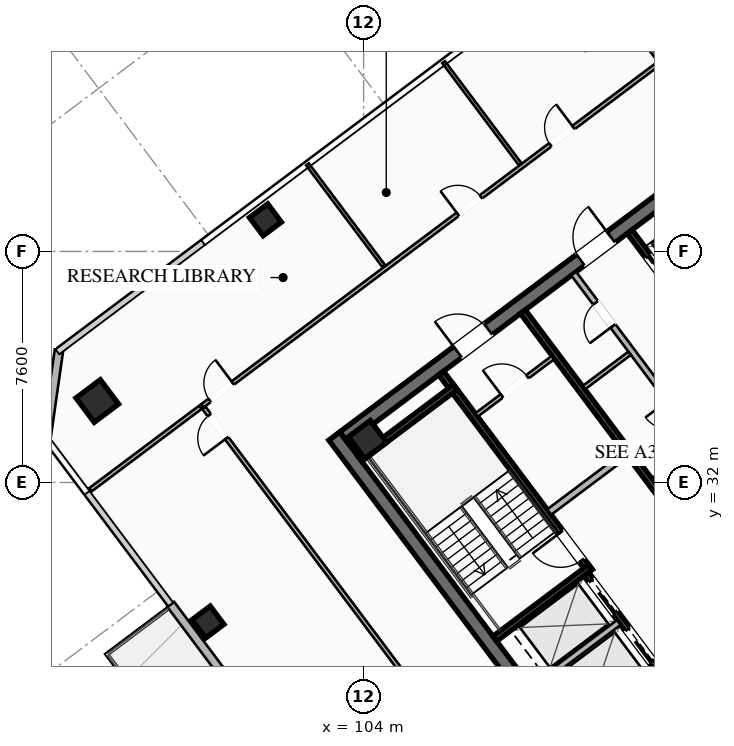
"""IFC4 building model, lengths in metres.
Left out: names, types, materials, properties, quantities, classifications, styles, units other than length and angle.
Written with IfcOpenShell. Run it as: python <this file> out.ifc"""

import sys

from ifc_helpers import new_model, si_unit, direction, frame, frame_2d, origin, origin_2d, place, context, subcontext, project, spatial, rectangle, hollow_rectangle, extrude, element, fill, save


model = new_model("IFC4")
c1 = context("Model", 3, precision=1e-05, world=origin(), true_north=direction((0.0, 1.0)))
c2 = subcontext(c1, "Body", "Model", "MODEL_VIEW")
j1 = project(units=[si_unit("LENGTHUNIT", "METRE"), si_unit("PLANEANGLEUNIT", "RADIAN")], contexts=[c1])
p1 = place(None, origin())
s1 = spatial("IfcSite", under=j1, at=p1, CompositionType="ELEMENT")
p2 = place(p1, origin())
s2 = spatial("IfcBuilding", under=s1, at=p2, CompositionType="ELEMENT")
p3 = place(p2, frame((0.0, 0.0, 221.95)))
s3 = spatial("IfcBuildingStorey", under=s2, at=p3, CompositionType="ELEMENT", Elevation=221.95)
p4 = place(p3, frame((112.396, 21.047, 0.0), z_axis=(0.0, 0.0, 1.0), x_axis=(-0.600005007985, 0.799996243986, 0.0)))
e1 = element("IfcWall", 1, at=p4, inside=s3, PredefinedType="SHEAR", context=c2, shape_type="SweptSolid", body=[
    extrude(rectangle(XDim=15.6, YDim=0.45, at=frame_2d((7.8, 0.0))), origin(), (0.0, 0.0, 1.0), 3.55),
])
p5 = place(p3, frame((124.649, 30.518, 0.0), z_axis=(0.0, 0.0, 1.0), x_axis=(-0.8, -0.6, 0.0)))
e2 = element("IfcWall", 2, at=p5, inside=s3, PredefinedType="SHEAR", context=c2, shape_type="SweptSolid", body=[
    extrude(rectangle(XDim=15.26, YDim=0.45, at=frame_2d((7.63, 0.0))), origin(), (0.0, 0.0, 1.0), 3.55),
])
p6 = place(p5, frame((9.33, 0.0, 0.0)))
e3 = element("IfcOpeningElement", 3, at=p6, cuts=e2, PredefinedType="OPENING", context=c2, shape_type="SweptSolid", body=[
    extrude(rectangle(XDim=1.25, YDim=2.25, at=frame_2d((0.625, 1.125))), frame((0.0, 0.235, 0.0), z_axis=(0.0, -1.0, 0.0), x_axis=(1.0, 0.0, 0.0)), (0.0, 0.0, 1.0), 0.47),
])
p7 = place(p5, frame((4.28, 0.0, 0.0)))
e4 = element("IfcOpeningElement", 4, at=p7, cuts=e2, PredefinedType="OPENING", context=c2, shape_type="SweptSolid", body=[
    extrude(rectangle(XDim=1.25, YDim=2.25, at=frame_2d((0.625, 1.125))), frame((0.0, 0.235, 0.0), z_axis=(0.0, -1.0, 0.0), x_axis=(1.0, 0.0, 0.0)), (0.0, 0.0, 1.0), 0.47),
])
p8 = place(p3, frame((103.351, 33.482, 0.0), z_axis=(0.0, 0.0, 1.0), x_axis=(0.8, 0.6, 0.0)))
e5 = element("IfcWall", 5, at=p8, inside=s3, PredefinedType="SHEAR", context=c2, shape_type="SweptSolid", body=[
    extrude(rectangle(XDim=15.26, YDim=0.45, at=frame_2d((7.63, 0.0))), origin(), (0.0, 0.0, 1.0), 3.55),
])
p9 = place(p8, frame((4.68, 0.0, 0.0)))
e6 = element("IfcOpeningElement", 6, at=p9, cuts=e5, PredefinedType="OPENING", context=c2, shape_type="SweptSolid", body=[
    extrude(rectangle(XDim=1.25, YDim=2.25, at=frame_2d((0.625, 1.125))), frame((0.0, 0.235, 0.0), z_axis=(0.0, -1.0, 0.0), x_axis=(1.0, 0.0, 0.0)), (0.0, 0.0, 1.0), 0.47),
])
p10 = place(p8, frame((9.73, 0.0, 0.0)))
e7 = element("IfcOpeningElement", 7, at=p10, cuts=e5, PredefinedType="OPENING", context=c2, shape_type="SweptSolid", body=[
    extrude(rectangle(XDim=1.25, YDim=2.25, at=frame_2d((0.625, 1.125))), frame((0.0, 0.235, 0.0), z_axis=(0.0, -1.0, 0.0), x_axis=(1.0, 0.0, 0.0)), (0.0, 0.0, 1.0), 0.47),
])
p11 = place(p3, frame((104.13, 33.41, 0.0), z_axis=(0.0, 0.0, 1.0), x_axis=(0.799999996291, 0.600000004945, 0.0)))
e8 = element("IfcColumn", 8, at=p11, inside=s3, PredefinedType="COLUMN", context=c2, shape_type="SweptSolid", body=[
    extrude(hollow_rectangle(XDim=0.9, YDim=0.9, WallThickness=0.04, at=origin_2d()), origin(), (0.0, 0.0, 1.0), 3.37),
])
p12 = place(p3, frame((95.24, 34.68, 0.0), z_axis=(0.0, 0.0, 1.0), x_axis=(0.799999996291, 0.600000004945, 0.0)))
e9 = element("IfcColumn", 9, at=p12, inside=s3, PredefinedType="COLUMN", context=c2, shape_type="SweptSolid", body=[
    extrude(hollow_rectangle(XDim=1.0, YDim=1.0, WallThickness=0.04, at=origin_2d()), origin(), (0.0, 0.0, 1.0), 3.37),
])
for number, where, z_axis, x_axis in (
    (10, (100.77, 40.64, 0.0), (0.0, 0.0, 1.0), (0.8, 0.6, 0.0)),
    (11, (98.88, 27.41, 0.0), (0.0, 0.0, 1.0), (0.8, 0.6, 0.0)),
):
    element("IfcColumn", number, at=place(p3, frame(where, z_axis=z_axis, x_axis=x_axis)), inside=s3, PredefinedType="COLUMN", context=c2, shape_type="SweptSolid", body=[
        extrude(hollow_rectangle(XDim=0.75, YDim=0.75, WallThickness=0.032, at=origin_2d()), origin(), (0.0, 0.0, 1.0), 3.37),
    ])
p13 = place(p3, frame((105.576, 17.432, 0.0), z_axis=(0.0, 0.0, 1.0), x_axis=(-0.599994081423, 0.800004438899, 0.0)))
e12 = element("IfcWall", 12, at=p13, inside=s3, PredefinedType="SOLIDWALL", context=c2, shape_type="SweptSolid", body=[
    extrude(rectangle(XDim=13.2, YDim=0.28, at=frame_2d((6.6, 0.0))), origin(), (0.0, 0.0, 1.0), 3.37),
])
p14 = place(p13, frame((5.95, 0.0, 0.0)))
e13 = element("IfcOpeningElement", 13, at=p14, cuts=e12, PredefinedType="OPENING", context=c2, shape_type="SweptSolid", body=[
    extrude(rectangle(XDim=1.3, YDim=2.15, at=frame_2d((0.65, 1.075))), frame((0.0, 0.15, 0.0), z_axis=(0.0, -1.0, 0.0), x_axis=(1.0, 0.0, 0.0)), (0.0, 0.0, 1.0), 0.3),
])
p15 = place(p13, frame((3.732, 0.0, 0.85)))
e14 = element("IfcOpeningElement", 14, at=p15, cuts=e12, PredefinedType="OPENING", context=c2, shape_type="SweptSolid", body=[
    extrude(rectangle(XDim=1.8, YDim=1.92, at=frame_2d((0.9, 0.96))), frame((0.0, 0.15, 0.0), z_axis=(0.0, -1.0, 0.0), x_axis=(1.0, 0.0, 0.0)), (0.0, 0.0, 1.0), 0.3),
])
p16 = place(p13, frame((7.668, 0.0, 0.85)))
e15 = element("IfcOpeningElement", 15, at=p16, cuts=e12, PredefinedType="OPENING", context=c2, shape_type="SweptSolid", body=[
    extrude(rectangle(XDim=1.8, YDim=1.92, at=frame_2d((0.9, 0.96))), frame((0.0, 0.15, 0.0), z_axis=(0.0, -1.0, 0.0), x_axis=(1.0, 0.0, 0.0)), (0.0, 0.0, 1.0), 0.3),
])
p17 = place(p3, frame((93.56, 33.42, 0.0), z_axis=(0.0, 0.0, 1.0), x_axis=(0.14138683146, 0.989954425158, 0.0)))
e16 = element("IfcWall", 16, at=p17, inside=s3, PredefinedType="SOLIDWALL", context=c2, shape_type="SweptSolid", body=[
    extrude(rectangle(XDim=2.97, YDim=0.28, at=frame_2d((1.485, 0.0))), origin(), (0.0, 0.0, 1.0), 3.37),
])
p18 = place(p3, frame((111.44, 29.08, 0.0), z_axis=(0.0, 0.0, 1.0), x_axis=(-0.59999041401, 0.800007189403, 0.0)))
e17 = element("IfcWall", 17, at=p18, inside=s3, PredefinedType="SHEAR", context=c2, shape_type="SweptSolid", body=[
    extrude(rectangle(XDim=8.15, YDim=0.2, at=frame_2d((4.075, 0.0))), origin(), (0.0, 0.0, 1.0), 3.37),
])
p19 = place(p18, frame((0.45, 0.0, 0.0)))
e18 = element("IfcOpeningElement", 18, at=p19, cuts=e17, PredefinedType="OPENING", context=c2, shape_type="SweptSolid", body=[
    extrude(rectangle(XDim=1.15, YDim=2.2, at=frame_2d((0.575, 1.1))), frame((0.0, 0.11, 0.0), z_axis=(0.0, -1.0, 0.0), x_axis=(1.0, 0.0, 0.0)), (0.0, 0.0, 1.0), 0.22),
])
for number, where, z_axis, x_axis in (
    (19, (108.316, 26.862, 0.0), (0.0, 0.0, 1.0), (0.8, 0.6, 0.0)),
    (20, (103.876, 32.782, 0.0), (0.0, 0.0, 1.0), (0.8, 0.6, 0.0)),
):
    element("IfcWall", number, at=place(p3, frame(where, z_axis=z_axis, x_axis=x_axis)), inside=s3, PredefinedType="SHEAR", context=c2, shape_type="SweptSolid", body=[
        extrude(rectangle(XDim=3.93, YDim=0.2, at=frame_2d((1.965, 0.0))), origin(), (0.0, 0.0, 1.0), 3.37),
    ])
p20 = place(p3, frame((118.058, 25.856, 0.0), z_axis=(0.0, 0.0, 1.0), x_axis=(-0.600002657301, 0.799998007018, 0.0)))
e21 = element("IfcWall", 21, at=p20, inside=s3, PredefinedType="SHEAR", context=c2, shape_type="SweptSolid", body=[
    extrude(rectangle(XDim=14.7, YDim=0.2, at=frame_2d((7.35, 0.0))), origin(), (0.0, 0.0, 1.0), 3.37),
])
p21 = place(p3, frame((110.104, 31.028, 0.0), z_axis=(0.0, 0.0, 1.0), x_axis=(0.800018601094, 0.59997519774, 0.0)))
e22 = element("IfcWall", 22, at=p21, inside=s3, PredefinedType="SOLIDWALL", context=c2, shape_type="SweptSolid", body=[
    extrude(rectangle(XDim=3.15, YDim=0.22, at=frame_2d((1.575, 0.0))), origin(), (0.0, 0.0, 1.0), 2.723),
])
p22 = place(p3, frame((115.25, 23.75, 0.0), z_axis=(0.0, 0.0, 1.0), x_axis=(-0.599994036198, 0.800004472816, 0.0)))
e23 = element("IfcWall", 23, at=p22, inside=s3, PredefinedType="SHEAR", context=c2, shape_type="SweptSolid", body=[
    extrude(rectangle(XDim=6.55, YDim=0.2, at=frame_2d((3.275, 0.0))), origin(), (0.0, 0.0, 1.0), 3.37),
])
p23 = place(p22, frame((4.975, 0.0, 0.0)))
e24 = element("IfcOpeningElement", 24, at=p23, cuts=e23, PredefinedType="OPENING", context=c2, shape_type="SweptSolid", body=[
    extrude(rectangle(XDim=1.3, YDim=2.25, at=frame_2d((0.65, 1.125))), frame((0.0, 0.11, 0.0), z_axis=(0.0, -1.0, 0.0), x_axis=(1.0, 0.0, 0.0)), (0.0, 0.0, 1.0), 0.22),
])
p24 = place(p22, frame((2.975, 0.0, 0.0)))
e25 = element("IfcOpeningElement", 25, at=p24, cuts=e23, PredefinedType="OPENING", context=c2, shape_type="SweptSolid", body=[
    extrude(rectangle(XDim=1.3, YDim=2.25, at=frame_2d((0.65, 1.125))), frame((0.0, 0.11, 0.0), z_axis=(0.0, -1.0, 0.0), x_axis=(1.0, 0.0, 0.0)), (0.0, 0.0, 1.0), 0.22),
])
p25 = place(p22, frame((0.775, 0.0, 0.0)))
e26 = element("IfcOpeningElement", 26, at=p25, cuts=e23, PredefinedType="OPENING", context=c2, shape_type="SweptSolid", body=[
    extrude(rectangle(XDim=1.3, YDim=2.25, at=frame_2d((0.65, 1.125))), frame((0.0, 0.11, 0.0), z_axis=(0.0, -1.0, 0.0), x_axis=(1.0, 0.0, 0.0)), (0.0, 0.0, 1.0), 0.22),
])
p26 = place(p3, frame((109.528, 25.246, 0.0), z_axis=(0.0, 0.0, 1.0), x_axis=(0.800008183455, 0.599989088572, 0.0)))
e27 = element("IfcWall", 27, at=p26, inside=s3, PredefinedType="SOLIDWALL", context=c2, shape_type="SweptSolid", body=[
    extrude(rectangle(XDim=3.58, YDim=0.2, at=frame_2d((1.79, 0.0))), origin(), (0.0, 0.0, 1.0), 3.37),
])
p27 = place(p3, frame((112.75, 40.25, 0.0), z_axis=(0.0, 0.0, 1.0), x_axis=(0.599994036198, -0.800004472816, 0.0)))
e28 = element("IfcWall", 28, at=p27, inside=s3, PredefinedType="SHEAR", context=c2, shape_type="SweptSolid", body=[
    extrude(rectangle(XDim=6.55, YDim=0.2, at=frame_2d((3.275, 0.0))), origin(), (0.0, 0.0, 1.0), 3.37),
])
p28 = place(p27, frame((5.075, 0.0, 0.0)))
e29 = element("IfcOpeningElement", 29, at=p28, cuts=e28, PredefinedType="OPENING", context=c2, shape_type="SweptSolid", body=[
    extrude(rectangle(XDim=1.1, YDim=2.2, at=frame_2d((0.55, 1.1))), frame((0.0, 0.11, 0.0), z_axis=(0.0, -1.0, 0.0), x_axis=(1.0, 0.0, 0.0)), (0.0, 0.0, 1.0), 0.22),
])
p29 = place(p27, frame((3.025, 0.0, 0.0)))
e30 = element("IfcOpeningElement", 30, at=p29, cuts=e28, PredefinedType="OPENING", context=c2, shape_type="SweptSolid", body=[
    extrude(rectangle(XDim=1.1, YDim=2.2, at=frame_2d((0.55, 1.1))), frame((0.0, 0.11, 0.0), z_axis=(0.0, -1.0, 0.0), x_axis=(1.0, 0.0, 0.0)), (0.0, 0.0, 1.0), 0.22),
])
p30 = place(p27, frame((1.025, 0.0, 0.0)))
e31 = element("IfcOpeningElement", 31, at=p30, cuts=e28, PredefinedType="OPENING", context=c2, shape_type="SweptSolid", body=[
    extrude(rectangle(XDim=1.1, YDim=2.2, at=frame_2d((0.55, 1.1))), frame((0.0, 0.11, 0.0), z_axis=(0.0, -1.0, 0.0), x_axis=(1.0, 0.0, 0.0)), (0.0, 0.0, 1.0), 0.22),
])
p31 = place(p3, frame((107.71, 34.22, 0.0), z_axis=(0.0, 0.0, 1.0), x_axis=(0.799981399002, 0.60002480053, 0.0)))
e32 = element("IfcWall", 32, at=p31, inside=s3, PredefinedType="PARTITIONING", context=c2, shape_type="SweptSolid", body=[
    extrude(rectangle(XDim=3.15, YDim=0.135, at=frame_2d((1.575, 0.0))), origin(), (0.0, 0.0, 1.0), 2.723),
])
p32 = place(p31, frame((1.05, 0.0, 0.0)))
e33 = element("IfcOpeningElement", 33, at=p32, cuts=e32, PredefinedType="OPENING", context=c2, shape_type="SweptSolid", body=[
    extrude(rectangle(XDim=1.05, YDim=2.2, at=frame_2d((0.525, 1.1))), frame((0.0, 0.077, 0.0), z_axis=(0.0, -1.0, 0.0), x_axis=(1.0, 0.0, 0.0)), (0.0, 0.0, 1.0), 0.155),
])
p33 = place(p3, frame((115.11, 33.27, 0.0), z_axis=(0.0, 0.0, 1.0), x_axis=(-0.600011160345, 0.79999162962, 0.0)))
e34 = element("IfcWall", 34, at=p33, inside=s3, PredefinedType="SOLIDWALL", context=c2, shape_type="SweptSolid", body=[
    extrude(rectangle(XDim=7.0, YDim=0.2, at=frame_2d((3.5, 0.0))), origin(), (0.0, 0.0, 1.0), 2.723),
])
p34 = place(p33, frame((0.85, 0.0, 0.0)))
e35 = element("IfcOpeningElement", 35, at=p34, cuts=e34, PredefinedType="OPENING", context=c2, shape_type="SweptSolid", body=[
    extrude(rectangle(XDim=0.95, YDim=2.05, at=frame_2d((0.475, 1.025))), frame((0.0, 0.11, 0.0), z_axis=(0.0, -1.0, 0.0), x_axis=(1.0, 0.0, 0.0)), (0.0, 0.0, 1.0), 0.22),
])
p35 = place(p33, frame((4.85, 0.0, 0.0)))
e36 = element("IfcOpeningElement", 36, at=p35, cuts=e34, PredefinedType="OPENING", context=c2, shape_type="SweptSolid", body=[
    extrude(rectangle(XDim=0.95, YDim=2.05, at=frame_2d((0.475, 1.025))), frame((0.0, 0.11, 0.0), z_axis=(0.0, -1.0, 0.0), x_axis=(1.0, 0.0, 0.0)), (0.0, 0.0, 1.0), 0.22),
])
p36 = place(p3, frame((113.526, 32.082, 0.0), z_axis=(0.0, 0.0, 1.0), x_axis=(0.800046745961, 0.599937666993, 0.0)))
e37 = element("IfcWall", 37, at=p36, inside=s3, PredefinedType="PARTITIONING", context=c2, shape_type="SweptSolid", body=[
    extrude(rectangle(XDim=1.88, YDim=0.135, at=frame_2d((0.94, 0.0))), origin(), (0.0, 0.0, 1.0), 2.723),
])
p37 = place(p3, frame((111.246, 35.122, 0.0), z_axis=(0.0, 0.0, 1.0), x_axis=(0.8, 0.6, 0.0)))
e38 = element("IfcWall", 38, at=p37, inside=s3, PredefinedType="PARTITIONING", context=c2, shape_type="SweptSolid", body=[
    extrude(rectangle(XDim=1.88, YDim=0.135, at=frame_2d((0.94, 0.0))), origin(), (0.0, 0.0, 1.0), 2.723),
])
p38 = place(p3, frame((98.696, 34.522, 0.0), z_axis=(0.0, 0.0, 1.0), x_axis=(0.799998778269, 0.600001628972, 0.0)))
e39 = element("IfcWall", 39, at=p38, inside=s3, PredefinedType="PARTITIONING", context=c2, shape_type="SweptSolid", body=[
    extrude(rectangle(XDim=23.98, YDim=0.135, at=frame_2d((11.99, 0.0))), origin(), (0.0, 0.0, 1.0), 2.723),
])
p39 = place(p38, frame((0.3, 0.0, 0.0)))
e40 = element("IfcOpeningElement", 40, at=p39, cuts=e39, PredefinedType="OPENING", context=c2, shape_type="SweptSolid", body=[
    extrude(rectangle(XDim=0.95, YDim=2.05, at=frame_2d((0.475, 1.025))), frame((0.0, 0.077, 0.0), z_axis=(0.0, -1.0, 0.0), x_axis=(1.0, 0.0, 0.0)), (0.0, 0.0, 1.0), 0.155),
])
p40 = place(p38, frame((10.503, 0.0, 0.0)))
e41 = element("IfcOpeningElement", 41, at=p40, cuts=e39, PredefinedType="OPENING", context=c2, shape_type="SweptSolid", body=[
    extrude(rectangle(XDim=0.95, YDim=2.05, at=frame_2d((0.475, 1.025))), frame((0.0, 0.077, 0.0), z_axis=(0.0, -1.0, 0.0), x_axis=(1.0, 0.0, 0.0)), (0.0, 0.0, 1.0), 0.155),
])
p41 = place(p38, frame((14.308, 0.0, 0.0)))
e42 = element("IfcOpeningElement", 42, at=p41, cuts=e39, PredefinedType="OPENING", context=c2, shape_type="SweptSolid", body=[
    extrude(rectangle(XDim=0.95, YDim=2.05, at=frame_2d((0.475, 1.025))), frame((0.0, 0.077, 0.0), z_axis=(0.0, -1.0, 0.0), x_axis=(1.0, 0.0, 0.0)), (0.0, 0.0, 1.0), 0.155),
])
p42 = place(p38, frame((22.73, 0.0, 0.0)))
e43 = element("IfcOpeningElement", 43, at=p42, cuts=e39, PredefinedType="OPENING", context=c2, shape_type="SweptSolid", body=[
    extrude(rectangle(XDim=0.95, YDim=2.05, at=frame_2d((0.475, 1.025))), frame((0.0, 0.077, 0.0), z_axis=(0.0, -1.0, 0.0), x_axis=(1.0, 0.0, 0.0)), (0.0, 0.0, 1.0), 0.155),
])
p43 = place(p3, frame((104.672, 39.104, 0.0), z_axis=(0.0, 0.0, 1.0), x_axis=(-0.59999069958, 0.80000697523, 0.0)))
e44 = element("IfcWall", 44, at=p43, inside=s3, PredefinedType="PARTITIONING", context=c2, shape_type="SweptSolid", body=[
    extrude(rectangle(XDim=4.2, YDim=0.11, at=frame_2d((2.1, 0.0))), origin(), (0.0, 0.0, 1.0), 2.723),
])
for number, where, z_axis, x_axis in (
    (45, (109.152, 42.464, 0.0), (0.0, 0.0, 1.0), (-0.6, 0.8, 0.0)),
    (46, (113.712, 45.884, 0.0), (0.0, 0.0, 1.0), (-0.6, 0.8, 0.0)),
):
    element("IfcWall", number, at=place(p3, frame(where, z_axis=z_axis, x_axis=x_axis)), inside=s3, PredefinedType="PARTITIONING", context=c2, shape_type="SweptSolid", body=[
        extrude(rectangle(XDim=4.2, YDim=0.11, at=frame_2d((2.1, 0.0))), origin(), (0.0, 0.0, 1.0), 2.723),
    ])
p44 = place(p3, frame((123.322, 26.904, 0.0), z_axis=(0.0, 0.0, 1.0), x_axis=(-0.799996127317, -0.600005163543, 0.0)))
e47 = element("IfcWall", 47, at=p44, inside=s3, PredefinedType="PARTITIONING", context=c2, shape_type="SweptSolid", body=[
    extrude(rectangle(XDim=15.13, YDim=0.135, at=frame_2d((7.565, 0.0))), origin(), (0.0, 0.0, 1.0), 2.723),
])
p45 = place(p44, frame((13.8, 0.0, 0.0)))
e48 = element("IfcOpeningElement", 48, at=p45, cuts=e47, PredefinedType="OPENING", context=c2, shape_type="SweptSolid", body=[
    extrude(rectangle(XDim=0.95, YDim=2.05, at=frame_2d((0.475, 1.025))), frame((0.0, 0.077, 0.0), z_axis=(0.0, -1.0, 0.0), x_axis=(1.0, 0.0, 0.0)), (0.0, 0.0, 1.0), 0.155),
])
p46 = place(p44, frame((3.672, 0.0, 0.0)))
e49 = element("IfcOpeningElement", 49, at=p46, cuts=e47, PredefinedType="OPENING", context=c2, shape_type="SweptSolid", body=[
    extrude(rectangle(XDim=0.95, YDim=2.05, at=frame_2d((0.475, 1.025))), frame((0.0, 0.077, 0.0), z_axis=(0.0, -1.0, 0.0), x_axis=(1.0, 0.0, 0.0)), (0.0, 0.0, 1.0), 0.155),
])
p47 = place(p3, frame((111.17, 17.89, 0.0), z_axis=(0.0, 0.0, 1.0), x_axis=(-0.599998113842, 0.800001414615, 0.0)))
e50 = element("IfcWall", 50, at=p47, inside=s3, PredefinedType="PARTITIONING", context=c2, shape_type="SweptSolid", body=[
    extrude(rectangle(XDim=20.71, YDim=0.135, at=frame_2d((10.355, 0.0))), origin(), (0.0, 0.0, 1.0), 2.723),
])
p48 = place(p47, frame((19.46, 0.0, 0.0)))
e51 = element("IfcOpeningElement", 51, at=p48, cuts=e50, PredefinedType="OPENING", context=c2, shape_type="SweptSolid", body=[
    extrude(rectangle(XDim=0.95, YDim=2.05, at=frame_2d((0.475, 1.025))), frame((0.0, 0.077, 0.0), z_axis=(0.0, -1.0, 0.0), x_axis=(1.0, 0.0, 0.0)), (0.0, 0.0, 1.0), 0.155),
])
p49 = place(p3, frame((98.632, 34.474, 0.0), z_axis=(0.0, 0.0, 1.0), x_axis=(-0.799980555045, -0.600025925731, 0.0)))
e52 = element("IfcWall", 52, at=p49, inside=s3, PredefinedType="PARTITIONING", context=c2, shape_type="SweptSolid", body=[
    extrude(rectangle(XDim=4.52, YDim=0.135, at=frame_2d((2.26, 0.0))), origin(), (0.0, 0.0, 1.0), 2.723),
])
p50 = place(p9, origin())
e53 = element("IfcDoor", 53, at=p50, inside=s3, OperationType="SINGLE_SWING_LEFT", PredefinedType="DOOR", context=c2, shape_type="SweptSolid", body=[
    extrude(rectangle(XDim=1.25, YDim=2.25, at=frame_2d((0.625, 1.125))), frame((0.0, 0.025, 0.0), z_axis=(0.0, -1.0, 0.0), x_axis=(1.0, 0.0, 0.0)), (0.0, 0.0, 1.0), 0.05),
])
fill(e6, e53)
p51 = place(p10, origin())
e54 = element("IfcDoor", 54, at=p51, inside=s3, OperationType="SINGLE_SWING_RIGHT", PredefinedType="DOOR", context=c2, shape_type="SweptSolid", body=[
    extrude(rectangle(XDim=1.25, YDim=2.25, at=frame_2d((0.625, 1.125))), frame((0.0, 0.025, 0.0), z_axis=(0.0, -1.0, 0.0), x_axis=(1.0, 0.0, 0.0)), (0.0, 0.0, 1.0), 0.05),
])
fill(e7, e54)
p52 = place(p19, origin())
e55 = element("IfcDoor", 55, at=p52, inside=s3, OperationType="SINGLE_SWING_RIGHT", PredefinedType="DOOR", context=c2, shape_type="SweptSolid", body=[
    extrude(rectangle(XDim=1.15, YDim=2.2, at=frame_2d((0.575, 1.1))), frame((0.0, 0.025, 0.0), z_axis=(0.0, -1.0, 0.0), x_axis=(1.0, 0.0, 0.0)), (0.0, 0.0, 1.0), 0.05),
])
fill(e18, e55)
p53 = place(p32, origin())
e56 = element("IfcDoor", 56, at=p53, inside=s3, OperationType="SINGLE_SWING_LEFT", PredefinedType="DOOR", context=c2, shape_type="SweptSolid", body=[
    extrude(rectangle(XDim=1.05, YDim=2.2, at=frame_2d((0.525, 1.1))), frame((0.0, 0.025, 0.0), z_axis=(0.0, -1.0, 0.0), x_axis=(1.0, 0.0, 0.0)), (0.0, 0.0, 1.0), 0.05),
])
fill(e33, e56)
p54 = place(p35, origin())
e57 = element("IfcDoor", 57, at=p54, inside=s3, OperationType="SINGLE_SWING_LEFT", PredefinedType="DOOR", context=c2, shape_type="SweptSolid", body=[
    extrude(rectangle(XDim=0.95, YDim=2.05, at=frame_2d((0.475, 1.025))), frame((0.0, 0.025, 0.0), z_axis=(0.0, -1.0, 0.0), x_axis=(1.0, 0.0, 0.0)), (0.0, 0.0, 1.0), 0.05),
])
fill(e36, e57)
p55 = place(p39, origin())
e58 = element("IfcDoor", 58, at=p55, inside=s3, OperationType="SINGLE_SWING_RIGHT", PredefinedType="DOOR", context=c2, shape_type="SweptSolid", body=[
    extrude(rectangle(XDim=0.95, YDim=2.05, at=frame_2d((0.475, 1.025))), frame((0.0, 0.025, 0.0), z_axis=(0.0, -1.0, 0.0), x_axis=(1.0, 0.0, 0.0)), (0.0, 0.0, 1.0), 0.05),
])
fill(e40, e58)
p56 = place(p40, origin())
e59 = element("IfcDoor", 59, at=p56, inside=s3, OperationType="SINGLE_SWING_LEFT", PredefinedType="DOOR", context=c2, shape_type="SweptSolid", body=[
    extrude(rectangle(XDim=0.95, YDim=2.05, at=frame_2d((0.475, 1.025))), frame((0.0, 0.025, 0.0), z_axis=(0.0, -1.0, 0.0), x_axis=(1.0, 0.0, 0.0)), (0.0, 0.0, 1.0), 0.05),
])
fill(e41, e59)
p57 = place(p41, origin())
e60 = element("IfcDoor", 60, at=p57, inside=s3, OperationType="SINGLE_SWING_RIGHT", PredefinedType="DOOR", context=c2, shape_type="SweptSolid", body=[
    extrude(rectangle(XDim=0.95, YDim=2.05, at=frame_2d((0.475, 1.025))), frame((0.0, 0.025, 0.0), z_axis=(0.0, -1.0, 0.0), x_axis=(1.0, 0.0, 0.0)), (0.0, 0.0, 1.0), 0.05),
])
fill(e42, e60)
p58 = place(p48, origin())
e61 = element("IfcDoor", 61, at=p58, inside=s3, OperationType="SINGLE_SWING_LEFT", PredefinedType="DOOR", context=c2, shape_type="SweptSolid", body=[
    extrude(rectangle(XDim=0.95, YDim=2.05, at=frame_2d((0.475, 1.025))), frame((0.0, 0.025, 0.0), z_axis=(0.0, -1.0, 0.0), x_axis=(1.0, 0.0, 0.0)), (0.0, 0.0, 1.0), 0.05),
])
fill(e51, e61)
p59 = place(p23, origin())
e62 = element("IfcDoor", 62, at=p59, inside=s3, OperationType="SLIDING_TO_LEFT", PredefinedType="DOOR", context=c2, shape_type="SweptSolid", body=[
    extrude(rectangle(XDim=1.3, YDim=2.25, at=frame_2d((0.65, 1.125))), frame((0.0, 0.025, 0.0), z_axis=(0.0, -1.0, 0.0), x_axis=(1.0, 0.0, 0.0)), (0.0, 0.0, 1.0), 0.05),
])
fill(e24, e62)
p60 = place(p24, origin())
e63 = element("IfcDoor", 63, at=p60, inside=s3, OperationType="SLIDING_TO_LEFT", PredefinedType="DOOR", context=c2, shape_type="SweptSolid", body=[
    extrude(rectangle(XDim=1.3, YDim=2.25, at=frame_2d((0.65, 1.125))), frame((0.0, 0.025, 0.0), z_axis=(0.0, -1.0, 0.0), x_axis=(1.0, 0.0, 0.0)), (0.0, 0.0, 1.0), 0.05),
])
fill(e25, e63)
p61 = place(p30, origin())
e64 = element("IfcDoor", 64, at=p61, inside=s3, OperationType="SLIDING_TO_LEFT", PredefinedType="DOOR", context=c2, shape_type="SweptSolid", body=[
    extrude(rectangle(XDim=1.1, YDim=2.2, at=frame_2d((0.55, 1.1))), frame((0.0, 0.025, 0.0), z_axis=(0.0, -1.0, 0.0), x_axis=(1.0, 0.0, 0.0)), (0.0, 0.0, 1.0), 0.05),
])
fill(e31, e64)
save(model, sys.argv[1])
